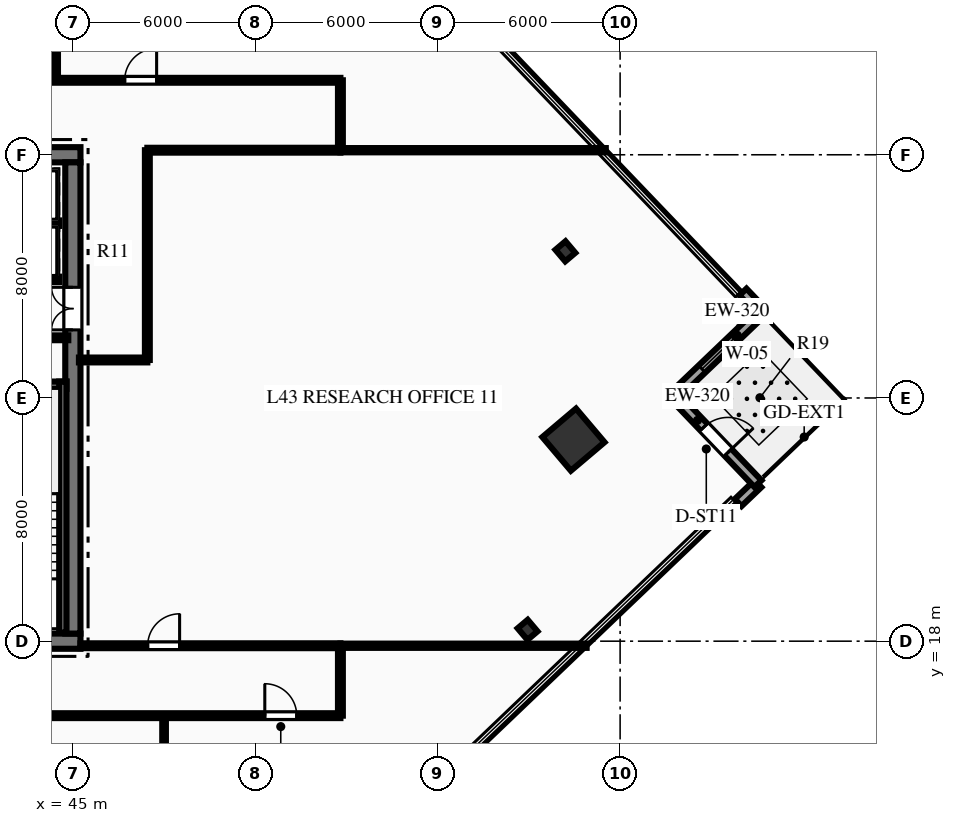
"""IFC4 building model, lengths in metres.
Left out: names, types, materials, properties, quantities, classifications, styles, units other than length and angle.
Written with IfcOpenShell. Run it as: python <this file> out.ifc"""

import sys

from ifc_helpers import new_model, si_unit, direction, frame, frame_2d, origin, origin_2d, place, context, subcontext, project, spatial, rectangle, hollow_rectangle, i_section, extrude, element, fill, save


model = new_model("IFC4")
c1 = context("Model", 3, precision=1e-05, world=origin(), true_north=direction((0.0, 1.0)))
c2 = subcontext(c1, "Body", "Model", "MODEL_VIEW")
j1 = project(units=[si_unit("LENGTHUNIT", "METRE"), si_unit("PLANEANGLEUNIT", "RADIAN")], contexts=[c1])
p1 = place(None, origin())
s1 = spatial("IfcSite", under=j1, at=p1, CompositionType="ELEMENT")
p2 = place(p1, origin())
s2 = spatial("IfcBuilding", under=s1, at=p2, CompositionType="ELEMENT")
p3 = place(p2, frame((0.0, 0.0, 174.45)))
s3 = spatial("IfcBuildingStorey", under=s2, at=p3, CompositionType="ELEMENT", Elevation=174.45)
p4 = place(p3, frame((26.75, 18.0, 0.0), z_axis=(0.0, 0.0, 1.0), x_axis=(1.0, 0.0, 0.0)))
e1 = element("IfcWall", 1, at=p4, inside=s3, PredefinedType="SHEAR", context=c2, shape_type="SweptSolid", body=[
    extrude(rectangle(XDim=18.5, YDim=0.5, at=frame_2d((9.25, 0.0))), origin(), (0.0, 0.0, 1.0), 3.75),
])
p5 = place(p4, frame((7.35, 0.0, 0.0)))
e2 = element("IfcOpeningElement", 2, at=p5, cuts=e1, PredefinedType="OPENING", context=c2, shape_type="SweptSolid", body=[
    extrude(rectangle(XDim=1.1, YDim=2.15, at=frame_2d((0.55, 1.075))), frame((0.0, 0.26, 0.0), z_axis=(0.0, -1.0, 0.0), x_axis=(1.0, 0.0, 0.0)), (0.0, 0.0, 1.0), 0.52),
])
p6 = place(p4, frame((10.05, 0.0, 0.0)))
e3 = element("IfcOpeningElement", 3, at=p6, cuts=e1, PredefinedType="OPENING", context=c2, shape_type="SweptSolid", body=[
    extrude(rectangle(XDim=1.1, YDim=2.15, at=frame_2d((0.55, 1.075))), frame((0.0, 0.26, 0.0), z_axis=(0.0, -1.0, 0.0), x_axis=(1.0, 0.0, 0.0)), (0.0, 0.0, 1.0), 0.52),
])
p7 = place(p3, frame((26.75, 34.0, 0.0), z_axis=(0.0, 0.0, 1.0), x_axis=(1.0, 0.0, 0.0)))
e4 = element("IfcWall", 4, at=p7, inside=s3, PredefinedType="SHEAR", context=c2, shape_type="SweptSolid", body=[
    extrude(rectangle(XDim=18.5, YDim=0.5, at=frame_2d((9.25, 0.0))), origin(), (0.0, 0.0, 1.0), 3.75),
])
p8 = place(p7, frame((13.935, 0.0, 0.0)))
e5 = element("IfcOpeningElement", 5, at=p8, cuts=e4, PredefinedType="OPENING", context=c2, shape_type="SweptSolid", body=[
    extrude(rectangle(XDim=1.1, YDim=2.15, at=frame_2d((0.55, 1.075))), frame((0.0, 0.26, 0.0), z_axis=(0.0, -1.0, 0.0), x_axis=(1.0, 0.0, 0.0)), (0.0, 0.0, 1.0), 0.52),
])
p9 = place(p7, frame((16.185, 0.0, 0.0)))
e6 = element("IfcOpeningElement", 6, at=p9, cuts=e4, PredefinedType="OPENING", context=c2, shape_type="SweptSolid", body=[
    extrude(rectangle(XDim=1.1, YDim=2.15, at=frame_2d((0.55, 1.075))), frame((0.0, 0.26, 0.0), z_axis=(0.0, -1.0, 0.0), x_axis=(1.0, 0.0, 0.0)), (0.0, 0.0, 1.0), 0.52),
])
p10 = place(p3, frame((45.0, 18.25, 0.0), z_axis=(0.0, 0.0, 1.0), x_axis=(0.0, 1.0, 0.0)))
e7 = element("IfcWall", 7, at=p10, inside=s3, PredefinedType="SHEAR", context=c2, shape_type="SweptSolid", body=[
    extrude(rectangle(XDim=15.5, YDim=0.5, at=frame_2d((7.75, 0.0))), origin(), (0.0, 0.0, 1.0), 3.75),
])
p11 = place(p10, frame((9.99, 0.0, 0.0)))
e8 = element("IfcOpeningElement", 8, at=p11, cuts=e7, PredefinedType="OPENING", context=c2, shape_type="SweptSolid", body=[
    extrude(rectangle(XDim=1.4, YDim=2.2, at=frame_2d((0.7, 1.1))), frame((0.0, 0.26, 0.0), z_axis=(0.0, -1.0, 0.0), x_axis=(1.0, 0.0, 0.0)), (0.0, 0.0, 1.0), 0.52),
])
p12 = place(p3, frame((40.81, 26.42, 0.0), z_axis=(0.0, 0.0, 1.0), x_axis=(1.0, 0.0, 0.0)))
e9 = element("IfcWall", 9, at=p12, inside=s3, PredefinedType="SHEAR", context=c2, shape_type="SweptSolid", body=[
    extrude(rectangle(XDim=3.98, YDim=0.24, at=frame_2d((1.99, 0.0))), origin(), (0.0, 0.0, 1.0), 3.75),
])
p13 = place(p3, frame((44.67, 18.28, 0.0), z_axis=(0.0, 0.0, 1.0), x_axis=(0.0, 1.0, 0.0)))
e10 = element("IfcWall", 10, at=p13, inside=s3, PredefinedType="SHEAR", context=c2, shape_type="SweptSolid", body=[
    extrude(rectangle(XDim=8.26, YDim=0.24, at=frame_2d((4.13, 0.0))), origin(), (0.0, 0.0, 1.0), 3.75),
])
p14 = place(p3, frame((61.465, 24.629, 0.0), z_axis=(0.0, 0.0, 1.0), x_axis=(0.763232469783, 0.646123979643, 0.0)))
e11 = element("IfcColumn", 11, at=p14, inside=s3, PredefinedType="COLUMN", context=c2, shape_type="SweptSolid", body=[
    extrude(hollow_rectangle(XDim=1.45, YDim=1.45, WallThickness=0.07, at=origin_2d()), origin(), (0.0, 0.0, 1.0), 3.75),
])
for number, where, z_axis, x_axis in (
    (12, (59.956, 18.373, 0.0), (0.0, 0.0, 1.0), (0.763, 0.646, 0.0)),
    (13, (61.199, 30.824, 0.0), (0.0, 0.0, 1.0), (0.763, 0.646, 0.0)),
):
    element("IfcColumn", number, at=place(p3, frame(where, z_axis=z_axis, x_axis=x_axis)), inside=s3, PredefinedType="COLUMN", context=c2, shape_type="SweptSolid", body=[
        extrude(i_section(OverallWidth=0.432, OverallDepth=0.498, WebThickness=0.056, FlangeThickness=0.089, at=origin_2d()), origin(), (0.0, 0.0, 1.0), 3.75),
    ])
p15 = place(p3, frame((67.534, 23.18, 0.0), z_axis=(0.0, 0.0, 1.0), x_axis=(-0.723059926528, -0.690785308652, 0.0)))
e14 = element("IfcWall", 14, at=p15, inside=s3, PredefinedType="STANDARD", context=c2, shape_type="SweptSolid", body=[
    extrude(rectangle(XDim=0.9, YDim=0.32, at=frame_2d((0.45, 0.0))), origin(), (0.0, 0.0, 1.0), 3.46),
])
p16 = place(p3, frame((64.771, 26.072, 0.0), z_axis=(0.0, 0.0, 1.0), x_axis=(0.690903852793, -0.722946655153, 0.0)))
e15 = element("IfcWall", 15, at=p16, inside=s3, PredefinedType="STANDARD", context=c2, shape_type="SweptSolid", body=[
    extrude(rectangle(XDim=4.0, YDim=0.32, at=frame_2d((2.0, 0.0))), origin(), (0.0, 0.0, 1.0), 3.46),
])
p17 = place(p16, frame((1.425, 0.0, 0.0)))
e16 = element("IfcOpeningElement", 16, at=p17, cuts=e15, PredefinedType="OPENING", context=c2, shape_type="SweptSolid", body=[
    extrude(rectangle(XDim=1.15, YDim=2.2, at=frame_2d((0.575, 1.1))), frame((0.0, 0.17, 0.0), z_axis=(0.0, -1.0, 0.0), x_axis=(1.0, 0.0, 0.0)), (0.0, 0.0, 1.0), 0.34),
])
p18 = place(p3, frame((67.663, 28.836, 0.0), z_axis=(0.0, 0.0, 1.0), x_axis=(-0.722975787647, -0.690873367902, 0.0)))
e17 = element("IfcWall", 17, at=p18, inside=s3, PredefinedType="STANDARD", context=c2, shape_type="SweptSolid", body=[
    extrude(rectangle(XDim=4.0, YDim=0.32, at=frame_2d((2.0, 0.0))), origin(), (0.0, 0.0, 1.0), 3.46),
])
p19 = place(p18, frame((1.275, 0.0, 0.85)))
e18 = element("IfcOpeningElement", 18, at=p19, cuts=e17, PredefinedType="OPENING", context=c2, shape_type="SweptSolid", body=[
    extrude(rectangle(XDim=1.45, YDim=2.05, at=frame_2d((0.725, 1.025))), frame((0.0, 0.17, 0.0), z_axis=(0.0, -1.0, 0.0), x_axis=(1.0, 0.0, 0.0)), (0.0, 0.0, 1.0), 0.34),
])
p20 = place(p3, frame((67.041, 29.486, 0.0), z_axis=(0.0, 0.0, 1.0), x_axis=(0.690920789475, -0.722930468767, 0.0)))
e19 = element("IfcWall", 19, at=p20, inside=s3, PredefinedType="STANDARD", context=c2, shape_type="SweptSolid", body=[
    extrude(rectangle(XDim=0.9, YDim=0.32, at=frame_2d((0.45, 0.0))), origin(), (0.0, 0.0, 1.0), 3.46),
])
p21 = place(p3, frame((40.8, 27.98, 0.0), z_axis=(0.0, 0.0, 1.0), x_axis=(1.0, 0.0, 0.0)))
e20 = element("IfcWall", 20, at=p21, inside=s3, PredefinedType="PARTITIONING", context=c2, shape_type="SweptSolid", body=[
    extrude(rectangle(XDim=4.05, YDim=0.16, at=frame_2d((2.025, 0.0))), origin(), (0.0, 0.0, 1.0), 3.46),
])
p22 = place(p21, frame((0.407, 0.0, 0.0)))
e21 = element("IfcOpeningElement", 21, at=p22, cuts=e20, PredefinedType="OPENING", context=c2, shape_type="SweptSolid", body=[
    extrude(rectangle(XDim=0.9, YDim=2.15, at=frame_2d((0.45, 1.075))), frame((0.0, 0.09, 0.0), z_axis=(0.0, -1.0, 0.0), x_axis=(1.0, 0.0, 0.0)), (0.0, 0.0, 1.0), 0.18),
])
p23 = place(p21, frame((2.2, 0.0, 0.0)))
e22 = element("IfcOpeningElement", 22, at=p23, cuts=e20, PredefinedType="OPENING", context=c2, shape_type="SweptSolid", body=[
    extrude(rectangle(XDim=0.9, YDim=2.15, at=frame_2d((0.45, 1.075))), frame((0.0, 0.09, 0.0), z_axis=(0.0, -1.0, 0.0), x_axis=(1.0, 0.0, 0.0)), (0.0, 0.0, 1.0), 0.18),
])
p24 = place(p3, frame((40.12, 29.9, 0.0), z_axis=(0.0, 0.0, 1.0), x_axis=(1.0, 0.0, 0.0)))
e23 = element("IfcWall", 23, at=p24, inside=s3, PredefinedType="PARTITIONING", context=c2, shape_type="SweptSolid", body=[
    extrude(rectangle(XDim=4.43, YDim=0.18, at=frame_2d((2.215, 0.0))), origin(), (0.0, 0.0, 1.0), 3.46),
])
p25 = place(p24, frame((0.565, 0.0, 0.0)))
e24 = element("IfcOpeningElement", 24, at=p25, cuts=e23, PredefinedType="OPENING", context=c2, shape_type="SweptSolid", body=[
    extrude(rectangle(XDim=1.1, YDim=2.15, at=frame_2d((0.55, 1.075))), frame((0.0, 0.1, 0.0), z_axis=(0.0, -1.0, 0.0), x_axis=(1.0, 0.0, 0.0)), (0.0, 0.0, 1.0), 0.2),
])
p26 = place(p24, frame((2.815, 0.0, 0.0)))
e25 = element("IfcOpeningElement", 25, at=p26, cuts=e23, PredefinedType="OPENING", context=c2, shape_type="SweptSolid", body=[
    extrude(rectangle(XDim=1.1, YDim=2.15, at=frame_2d((0.55, 1.075))), frame((0.0, 0.1, 0.0), z_axis=(0.0, -1.0, 0.0), x_axis=(1.0, 0.0, 0.0)), (0.0, 0.0, 1.0), 0.2),
])
p27 = place(p3, frame((40.12, 31.75, 0.0), z_axis=(0.0, 0.0, 1.0), x_axis=(1.0, 0.0, 0.0)))
e26 = element("IfcWall", 26, at=p27, inside=s3, PredefinedType="PARTITIONING", context=c2, shape_type="SweptSolid", body=[
    extrude(rectangle(XDim=4.43, YDim=0.18, at=frame_2d((2.215, 0.0))), origin(), (0.0, 0.0, 1.0), 3.46),
])
p28 = place(p3, frame((18.2, 15.55, 0.0), z_axis=(0.0, 0.0, 1.0), x_axis=(1.0, 0.0, 0.0)))
e27 = element("IfcWall", 27, at=p28, inside=s3, PredefinedType="PARTITIONING", context=c2, shape_type="SweptSolid", body=[
    extrude(rectangle(XDim=35.6, YDim=0.16, at=frame_2d((17.8, 0.0))), origin(), (0.0, 0.0, 1.0), 3.46),
])
p29 = place(p28, frame((3.985, 0.0, 0.0)))
e28 = element("IfcOpeningElement", 28, at=p29, cuts=e27, PredefinedType="OPENING", context=c2, shape_type="SweptSolid", body=[
    extrude(rectangle(XDim=1.05, YDim=2.15, at=frame_2d((0.525, 1.075))), frame((0.0, 0.09, 0.0), z_axis=(0.0, -1.0, 0.0), x_axis=(1.0, 0.0, 0.0)), (0.0, 0.0, 1.0), 0.18),
])
p30 = place(p28, frame((16.775, 0.0, 0.0)))
e29 = element("IfcOpeningElement", 29, at=p30, cuts=e27, PredefinedType="OPENING", context=c2, shape_type="SweptSolid", body=[
    extrude(rectangle(XDim=1.05, YDim=2.15, at=frame_2d((0.525, 1.075))), frame((0.0, 0.09, 0.0), z_axis=(0.0, -1.0, 0.0), x_axis=(1.0, 0.0, 0.0)), (0.0, 0.0, 1.0), 0.18),
])
p31 = place(p28, frame((24.055, 0.0, 0.0)))
e30 = element("IfcOpeningElement", 30, at=p31, cuts=e27, PredefinedType="OPENING", context=c2, shape_type="SweptSolid", body=[
    extrude(rectangle(XDim=1.05, YDim=2.15, at=frame_2d((0.525, 1.075))), frame((0.0, 0.09, 0.0), z_axis=(0.0, -1.0, 0.0), x_axis=(1.0, 0.0, 0.0)), (0.0, 0.0, 1.0), 0.18),
])
p32 = place(p28, frame((33.113, 0.0, 0.0)))
e31 = element("IfcOpeningElement", 31, at=p32, cuts=e27, PredefinedType="OPENING", context=c2, shape_type="SweptSolid", body=[
    extrude(rectangle(XDim=1.05, YDim=2.15, at=frame_2d((0.525, 1.075))), frame((0.0, 0.09, 0.0), z_axis=(0.0, -1.0, 0.0), x_axis=(1.0, 0.0, 0.0)), (0.0, 0.0, 1.0), 0.18),
])
p33 = place(p3, frame((45.25, 17.85, 0.0), z_axis=(0.0, 0.0, 1.0), x_axis=(1.0, 0.0, 0.0)))
e32 = element("IfcWall", 32, at=p33, inside=s3, PredefinedType="PARTITIONING", context=c2, shape_type="SweptSolid", body=[
    extrude(rectangle(XDim=8.55, YDim=0.16, at=frame_2d((4.275, 0.0))), origin(), (0.0, 0.0, 1.0), 2.839),
])
p34 = place(p33, frame((2.211, 0.0, 0.0)))
e33 = element("IfcOpeningElement", 33, at=p34, cuts=e32, PredefinedType="OPENING", context=c2, shape_type="SweptSolid", body=[
    extrude(rectangle(XDim=1.05, YDim=2.15, at=frame_2d((0.525, 1.075))), frame((0.0, 0.09, 0.0), z_axis=(0.0, -1.0, 0.0), x_axis=(1.0, 0.0, 0.0)), (0.0, 0.0, 1.0), 0.18),
])
p35 = place(p3, frame((18.2, 36.45, 0.0), z_axis=(0.0, 0.0, 1.0), x_axis=(1.0, 0.0, 0.0)))
e34 = element("IfcWall", 34, at=p35, inside=s3, PredefinedType="PARTITIONING", context=c2, shape_type="SweptSolid", body=[
    extrude(rectangle(XDim=35.6, YDim=0.16, at=frame_2d((17.8, 0.0))), origin(), (0.0, 0.0, 1.0), 3.46),
])
p36 = place(p35, frame((20.05, 0.0, 0.0)))
e35 = element("IfcOpeningElement", 35, at=p36, cuts=e34, PredefinedType="OPENING", context=c2, shape_type="SweptSolid", body=[
    extrude(rectangle(XDim=0.9, YDim=2.15, at=frame_2d((0.45, 1.075))), frame((0.0, 0.09, 0.0), z_axis=(0.0, -1.0, 0.0), x_axis=(1.0, 0.0, 0.0)), (0.0, 0.0, 1.0), 0.18),
])
p37 = place(p35, frame((22.35, 0.0, 0.0)))
e36 = element("IfcOpeningElement", 36, at=p37, cuts=e34, PredefinedType="OPENING", context=c2, shape_type="SweptSolid", body=[
    extrude(rectangle(XDim=0.9, YDim=2.15, at=frame_2d((0.45, 1.075))), frame((0.0, 0.09, 0.0), z_axis=(0.0, -1.0, 0.0), x_axis=(1.0, 0.0, 0.0)), (0.0, 0.0, 1.0), 0.18),
])
p38 = place(p35, frame((24.6, 0.0, 0.0)))
e37 = element("IfcOpeningElement", 37, at=p38, cuts=e34, PredefinedType="OPENING", context=c2, shape_type="SweptSolid", body=[
    extrude(rectangle(XDim=1.0, YDim=2.15, at=frame_2d((0.5, 1.075))), frame((0.0, 0.09, 0.0), z_axis=(0.0, -1.0, 0.0), x_axis=(1.0, 0.0, 0.0)), (0.0, 0.0, 1.0), 0.18),
])
p39 = place(p35, frame((1.757, 0.0, 0.0)))
e38 = element("IfcOpeningElement", 38, at=p39, cuts=e34, PredefinedType="OPENING", context=c2, shape_type="SweptSolid", body=[
    extrude(rectangle(XDim=1.05, YDim=2.15, at=frame_2d((0.525, 1.075))), frame((0.0, 0.09, 0.0), z_axis=(0.0, -1.0, 0.0), x_axis=(1.0, 0.0, 0.0)), (0.0, 0.0, 1.0), 0.18),
])
p40 = place(p35, frame((11.155, 0.0, 0.0)))
e39 = element("IfcOpeningElement", 39, at=p40, cuts=e34, PredefinedType="OPENING", context=c2, shape_type="SweptSolid", body=[
    extrude(rectangle(XDim=1.05, YDim=2.15, at=frame_2d((0.525, 1.075))), frame((0.0, 0.09, 0.0), z_axis=(0.0, -1.0, 0.0), x_axis=(1.0, 0.0, 0.0)), (0.0, 0.0, 1.0), 0.18),
])
p41 = place(p35, frame((28.505, 0.0, 0.0)))
e40 = element("IfcOpeningElement", 40, at=p41, cuts=e34, PredefinedType="OPENING", context=c2, shape_type="SweptSolid", body=[
    extrude(rectangle(XDim=1.05, YDim=2.15, at=frame_2d((0.525, 1.075))), frame((0.0, 0.09, 0.0), z_axis=(0.0, -1.0, 0.0), x_axis=(1.0, 0.0, 0.0)), (0.0, 0.0, 1.0), 0.18),
])
p42 = place(p3, frame((47.45, 34.15, 0.0), z_axis=(0.0, 0.0, 1.0), x_axis=(1.0, 0.0, 0.0)))
e41 = element("IfcWall", 41, at=p42, inside=s3, PredefinedType="PARTITIONING", context=c2, shape_type="SweptSolid", body=[
    extrude(rectangle(XDim=6.35, YDim=0.16, at=frame_2d((3.175, 0.0))), origin(), (0.0, 0.0, 1.0), 3.46),
])
p43 = place(p3, frame((47.45, 27.25, 0.0), z_axis=(0.0, 0.0, 1.0), x_axis=(0.0, 1.0, 0.0)))
e42 = element("IfcWall", 42, at=p43, inside=s3, PredefinedType="PARTITIONING", context=c2, shape_type="SweptSolid", body=[
    extrude(rectangle(XDim=6.9, YDim=0.16, at=frame_2d((3.45, 0.0))), origin(), (0.0, 0.0, 1.0), 3.46),
])
p44 = place(p3, frame((45.2, 27.25, 0.0), z_axis=(0.0, 0.0, 1.0), x_axis=(1.0, 0.0, 0.0)))
e43 = element("IfcWall", 43, at=p44, inside=s3, PredefinedType="PARTITIONING", context=c2, shape_type="SweptSolid", body=[
    extrude(rectangle(XDim=2.25, YDim=0.16, at=frame_2d((1.125, 0.0))), origin(), (0.0, 0.0, 1.0), 3.46),
])
for number, where, z_axis, x_axis in (
    (44, (53.8, 15.55, 0.0), (0.0, 0.0, 1.0), (0.0, 1.0, 0.0)),
    (45, (53.8, 34.15, 0.0), (0.0, 0.0, 1.0), (0.0, 1.0, 0.0)),
):
    element("IfcWall", number, at=place(p3, frame(where, z_axis=z_axis, x_axis=x_axis)), inside=s3, PredefinedType="PARTITIONING", context=c2, shape_type="SweptSolid", body=[
        extrude(rectangle(XDim=2.3, YDim=0.16, at=frame_2d((1.15, 0.0))), origin(), (0.0, 0.0, 1.0), 3.46),
    ])
p45 = place(p3, frame((44.45, 36.45, 0.0), z_axis=(0.0, 0.0, 1.0), x_axis=(0.0, 1.0, 0.0)))
e46 = element("IfcWall", 46, at=p45, inside=s3, PredefinedType="PARTITIONING", context=c2, shape_type="SweptSolid", body=[
    extrude(rectangle(XDim=3.9, YDim=0.12, at=frame_2d((1.95, 0.0))), origin(), (0.0, 0.0, 1.0), 3.46),
])
p46 = place(p3, frame((53.8, 17.85, 0.0), z_axis=(0.0, 0.0, 1.0), x_axis=(1.0, 0.0, 0.0)))
e47 = element("IfcWall", 47, at=p46, inside=s3, PredefinedType="PARTITIONING", context=c2, shape_type="SweptSolid", body=[
    extrude(rectangle(XDim=8.098, YDim=0.14, at=frame_2d((4.049, 0.0))), origin(), (0.0, 0.0, 1.0), 2.839),
])
p47 = place(p3, frame((53.8, 34.15, 0.0), z_axis=(0.0, 0.0, 1.0), x_axis=(1.0, 0.0, 0.0)))
e48 = element("IfcWall", 48, at=p47, inside=s3, PredefinedType="PARTITIONING", context=c2, shape_type="SweptSolid", body=[
    extrude(rectangle(XDim=8.729, YDim=0.14, at=frame_2d((4.364, 0.0))), origin(), (0.0, 0.0, 1.0), 3.46),
])
p48 = place(p3, frame((48.0, 4.568, 0.0), z_axis=(0.0, 0.0, 1.0), x_axis=(0.0, 1.0, 0.0)))
e49 = element("IfcWall", 49, at=p48, inside=s3, PredefinedType="PARTITIONING", context=c2, shape_type="SweptSolid", body=[
    extrude(rectangle(XDim=10.982, YDim=0.12, at=frame_2d((5.491, 0.0))), origin(), (0.0, 0.0, 1.0), 3.46),
])
p49 = place(p17, origin())
e50 = element("IfcDoor", 50, at=p49, inside=s3, OperationType="SINGLE_SWING_RIGHT", PredefinedType="DOOR", context=c2, shape_type="SweptSolid", body=[
    extrude(rectangle(XDim=1.15, YDim=2.2, at=frame_2d((0.575, 1.1))), frame((0.0, 0.025, 0.0), z_axis=(0.0, -1.0, 0.0), x_axis=(1.0, 0.0, 0.0)), (0.0, 0.0, 1.0), 0.05),
])
fill(e16, e50)
p50 = place(p19, origin())
e51 = element("IfcWindow", 51, at=p50, inside=s3, PartitioningType="SINGLE_PANEL", PredefinedType="WINDOW", context=c2, shape_type="SweptSolid", body=[
    extrude(rectangle(XDim=1.45, YDim=2.05, at=frame_2d((0.725, 1.025))), frame((0.0, 0.03, 0.0), z_axis=(0.0, -1.0, 0.0), x_axis=(1.0, 0.0, 0.0)), (0.0, 0.0, 1.0), 0.06),
])
fill(e18, e51)
p51 = place(p11, origin())
e52 = element("IfcDoor", 52, at=p51, inside=s3, OperationType="DOUBLE_DOOR_SINGLE_SWING", PredefinedType="DOOR", context=c2, shape_type="SweptSolid", body=[
    extrude(rectangle(XDim=1.4, YDim=2.2, at=frame_2d((0.7, 1.1))), frame((0.0, 0.025, 0.0), z_axis=(0.0, -1.0, 0.0), x_axis=(1.0, 0.0, 0.0)), (0.0, 0.0, 1.0), 0.05),
])
fill(e8, e52)
p52 = place(p32, origin())
e53 = element("IfcDoor", 53, at=p52, inside=s3, OperationType="SINGLE_SWING_LEFT", PredefinedType="DOOR", context=c2, shape_type="SweptSolid", body=[
    extrude(rectangle(XDim=1.05, YDim=2.15, at=frame_2d((0.525, 1.075))), frame((0.0, 0.025, 0.0), z_axis=(0.0, -1.0, 0.0), x_axis=(1.0, 0.0, 0.0)), (0.0, 0.0, 1.0), 0.05),
])
fill(e31, e53)
p53 = place(p41, origin())
e54 = element("IfcDoor", 54, at=p53, inside=s3, OperationType="SINGLE_SWING_RIGHT", PredefinedType="DOOR", context=c2, shape_type="SweptSolid", body=[
    extrude(rectangle(XDim=1.05, YDim=2.15, at=frame_2d((0.525, 1.075))), frame((0.0, 0.025, 0.0), z_axis=(0.0, -1.0, 0.0), x_axis=(1.0, 0.0, 0.0)), (0.0, 0.0, 1.0), 0.05),
])
fill(e40, e54)
p54 = place(p34, origin())
e55 = element("IfcDoor", 55, at=p54, inside=s3, OperationType="SINGLE_SWING_RIGHT", PredefinedType="DOOR", context=c2, shape_type="SweptSolid", body=[
    extrude(rectangle(XDim=1.05, YDim=2.15, at=frame_2d((0.525, 1.075))), frame((0.0, 0.025, 0.0), z_axis=(0.0, -1.0, 0.0), x_axis=(1.0, 0.0, 0.0)), (0.0, 0.0, 1.0), 0.05),
])
fill(e33, e55)
save(model, sys.argv[1])
